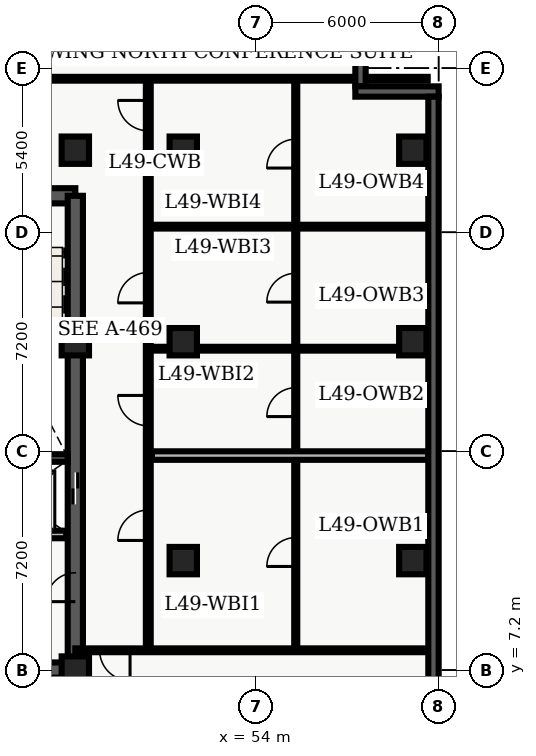
"""IFC4 building model, lengths in metres.
Left out: names, types, materials, properties, quantities, classifications, styles, units other than length and angle.
Written with IfcOpenShell. Run it as: python <this file> out.ifc"""

import sys

from ifc_helpers import new_model, entity, si_unit, converted_unit, direction, frame, origin_with_axes, origin_2d_with_axis, place, context, subcontext, project, spatial, polyline, rectangle, outline, extrude, element, fill, save


model = new_model("IFC4")
c1 = context("Model", 3, precision=1e-05, world=origin_with_axes(), true_north=direction((0.0, 1.0)))
c2 = subcontext(c1, "Body", "Model", "MODEL_VIEW")
j1 = project(units=[si_unit("LENGTHUNIT", "METRE"), converted_unit("PLANEANGLEUNIT", "DEGREE", entity("IfcPlaneAngleMeasure", 0.017), si_unit("PLANEANGLEUNIT", "RADIAN"), dimensions=[0, 0, 0, 0, 0, 0, 0])], contexts=[c1])
p1 = place(None, origin_with_axes())
s1 = spatial("IfcSite", under=j1, at=p1, CompositionType="ELEMENT")
p2 = place(p1, origin_with_axes())
s2 = spatial("IfcBuilding", under=s1, at=p2, CompositionType="ELEMENT")
p3 = place(p2, frame((0.0, 0.0, 200.4), z_axis=(0.0, 0.0, 1.0), x_axis=(1.0, 0.0, 0.0)))
s3 = spatial("IfcBuildingStorey", under=s2, at=p3, CompositionType="ELEMENT", Elevation=200.4)
p4 = place(p3, frame((40.2, 7.2, 0.0), z_axis=(0.0, 0.0, 1.0), x_axis=(1.0, 0.0, 0.0)))
e1 = element("IfcWall", 1, at=p4, inside=s3, PredefinedType="SHEAR", context=c2, shape_type="SweptSolid", body=[
    extrude(outline(polyline([(0.0, -0.25), (7.85, -0.25), (7.85, 0.25), (0.0, 0.25), (0.0, -0.25)])), origin_with_axes(), (0.0, 0.0, 1.0), 3.66),
])
p5 = place(p4, frame((2.175, 0.0, 0.0), z_axis=(0.0, 0.0, 1.0), x_axis=(1.0, 0.0, 0.0)))
e2 = element("IfcOpeningElement", 2, at=p5, cuts=e1, PredefinedType="OPENING", context=c2, shape_type="SweptSolid", body=[
    extrude(rectangle(XDim=1.05, YDim=0.52, at=origin_2d_with_axis()), origin_with_axes(), (0.0, 0.0, 1.0), 2.15),
])
p6 = place(p3, frame((40.2, 22.8, 0.0), z_axis=(0.0, 0.0, 1.0), x_axis=(1.0, 0.0, 0.0)))
e3 = element("IfcWall", 3, at=p6, inside=s3, PredefinedType="SHEAR", context=c2, shape_type="SweptSolid", body=[
    extrude(outline(polyline([(0.0, -0.25), (7.85, -0.25), (7.85, 0.25), (0.0, 0.25), (0.0, -0.25)])), origin_with_axes(), (0.0, 0.0, 1.0), 3.66),
])
p7 = place(p6, frame((5.775, 0.0, 0.0), z_axis=(0.0, 0.0, 1.0), x_axis=(1.0, 0.0, 0.0)))
e4 = element("IfcOpeningElement", 4, at=p7, cuts=e3, PredefinedType="OPENING", context=c2, shape_type="SweptSolid", body=[
    extrude(rectangle(XDim=1.05, YDim=0.52, at=origin_2d_with_axis()), origin_with_axes(), (0.0, 0.0, 1.0), 2.15),
])
p8 = place(p3, frame((48.05, 7.2, 0.0), z_axis=(0.0, 0.0, 1.0), x_axis=(0.0, 1.0, 0.0)))
e5 = element("IfcWall", 5, at=p8, inside=s3, PredefinedType="SHEAR", context=c2, shape_type="SweptSolid", body=[
    extrude(outline(polyline([(0.0, -0.25), (15.6, -0.25), (15.6, 0.25), (0.0, 0.25), (0.0, -0.25)])), origin_with_axes(), (0.0, 0.0, 1.0), 3.66),
])
p9 = place(p8, frame((5.975, 0.0, 0.0), z_axis=(0.0, 0.0, 1.0), x_axis=(1.0, 0.0, 0.0)))
e6 = element("IfcOpeningElement", 6, at=p9, cuts=e5, PredefinedType="OPENING", context=c2, shape_type="SweptSolid", body=[
    extrude(rectangle(XDim=1.05, YDim=0.52, at=origin_2d_with_axis()), origin_with_axes(), (0.0, 0.0, 1.0), 2.15),
])
p10 = place(p8, frame((2.725, 0.0, 0.0), z_axis=(0.0, 0.0, 1.0), x_axis=(1.0, 0.0, 0.0)))
e7 = element("IfcOpeningElement", 7, at=p10, cuts=e5, PredefinedType="OPENING", context=c2, shape_type="SweptSolid", body=[
    extrude(rectangle(XDim=0.95, YDim=0.52, at=origin_2d_with_axis()), origin_with_axes(), (0.0, 0.0, 1.0), 2.15),
])
p11 = place(p3, frame((44.25, 14.175, 0.0), z_axis=(0.0, 0.0, 1.0), x_axis=(1.0, 0.0, 0.0)))
e8 = element("IfcWall", 8, at=p11, inside=s3, PredefinedType="SHEAR", context=c2, shape_type="SweptSolid", body=[
    extrude(outline(polyline([(0.0, -0.125), (3.55, -0.125), (3.55, 0.125), (0.0, 0.125), (0.0, -0.125)])), origin_with_axes(), (0.0, 0.0, 1.0), 3.66),
])
for number, where, z_axis, x_axis in (
    (9, (48.05, 7.2, 0.0), (0.0, 0.0, 1.0), (1.0, 0.0, 0.0)),
    (10, (48.05, 18.0, 0.0), (0.0, 0.0, 1.0), (1.0, 0.0, 0.0)),
    (11, (48.05, 24.3, 0.0), (0.0, 0.0, 1.0), (1.0, 0.0, 0.0)),
    (12, (51.6, 10.8, 0.0), (0.0, 0.0, 1.0), (1.0, 0.0, 0.0)),
    (13, (51.6, 18.0, 0.0), (0.0, 0.0, 1.0), (1.0, 0.0, 0.0)),
    (14, (51.6, 24.3, 0.0), (0.0, 0.0, 1.0), (1.0, 0.0, 0.0)),
    (15, (59.15, 10.8, 0.0), (0.0, 0.0, 1.0), (1.0, 0.0, 0.0)),
    (16, (59.15, 18.0, 0.0), (0.0, 0.0, 1.0), (1.0, 0.0, 0.0)),
    (17, (59.15, 24.3, 0.0), (0.0, 0.0, 1.0), (1.0, 0.0, 0.0)),
):
    element("IfcColumn", number, at=place(p3, frame(where, z_axis=z_axis, x_axis=x_axis)), inside=s3, PredefinedType="COLUMN", context=c2, shape_type="SweptSolid", body=[
        extrude(rectangle(XDim=0.9, YDim=0.9, at=origin_2d_with_axis()), origin_with_axes(), (0.0, 0.0, 1.0), 3.9),
    ])
p12 = place(p3, frame((44.25, 11.66, 0.0), z_axis=(0.0, 0.0, 1.0), x_axis=(1.0, 0.0, 0.0)))
e18 = element("IfcWall", 18, at=p12, inside=s3, PredefinedType="SOLIDWALL", context=c2, shape_type="SweptSolid", body=[
    extrude(outline(polyline([(0.0, -0.125), (3.5, -0.125), (3.5, 0.125), (0.0, 0.125), (0.0, -0.125)])), origin_with_axes(), (0.0, 0.0, 1.0), 2.7),
])
p13 = place(p3, frame((50.45, 7.85, 0.0), z_axis=(0.0, 0.0, 1.0), x_axis=(0.0, 1.0, 0.0)))
e19 = element("IfcWall", 19, at=p13, inside=s3, PredefinedType="PARTITIONING", context=c2, shape_type="SweptSolid", body=[
    extrude(outline(polyline([(0.0, -0.08), (18.8, -0.08), (18.8, 0.08), (0.0, 0.08), (0.0, -0.08)])), origin_with_axes(), (0.0, 0.0, 1.0), 2.7),
])
p14 = place(p13, frame((4.113, 0.0, 0.0), z_axis=(0.0, 0.0, 1.0), x_axis=(1.0, 0.0, 0.0)))
e20 = element("IfcOpeningElement", 20, at=p14, cuts=e19, PredefinedType="OPENING", context=c2, shape_type="SweptSolid", body=[
    extrude(rectangle(XDim=1.0, YDim=0.18, at=origin_2d_with_axis()), origin_with_axes(), (0.0, 0.0, 1.0), 2.15),
])
p15 = place(p13, frame((7.883, 0.0, 0.0), z_axis=(0.0, 0.0, 1.0), x_axis=(1.0, 0.0, 0.0)))
e21 = element("IfcOpeningElement", 21, at=p15, cuts=e19, PredefinedType="OPENING", context=c2, shape_type="SweptSolid", body=[
    extrude(rectangle(XDim=1.0, YDim=0.18, at=origin_2d_with_axis()), origin_with_axes(), (0.0, 0.0, 1.0), 2.15),
])
p16 = place(p13, frame((11.928, 0.0, 0.0), z_axis=(0.0, 0.0, 1.0), x_axis=(1.0, 0.0, 0.0)))
e22 = element("IfcOpeningElement", 22, at=p16, cuts=e19, PredefinedType="OPENING", context=c2, shape_type="SweptSolid", body=[
    extrude(rectangle(XDim=1.0, YDim=0.18, at=origin_2d_with_axis()), origin_with_axes(), (0.0, 0.0, 1.0), 2.15),
])
p17 = place(p13, frame((17.587, 0.0, 0.0), z_axis=(0.0, 0.0, 1.0), x_axis=(1.0, 0.0, 0.0)))
e23 = element("IfcOpeningElement", 23, at=p17, cuts=e19, PredefinedType="OPENING", context=c2, shape_type="SweptSolid", body=[
    extrude(rectangle(XDim=1.0, YDim=0.18, at=origin_2d_with_axis()), origin_with_axes(), (0.0, 0.0, 1.0), 2.15),
])
p18 = place(p3, frame((59.665, 7.85, 0.0), z_axis=(0.0, 0.0, 1.0), x_axis=(-1.0, 0.0, 0.0)))
e24 = element("IfcWall", 24, at=p18, inside=s3, PredefinedType="PARTITIONING", context=c2, shape_type="SweptSolid", body=[
    extrude(outline(polyline([(0.0, -0.062), (11.615, -0.062), (11.615, 0.062), (0.0, 0.062), (0.0, -0.062)])), origin_with_axes(), (0.0, 0.0, 1.0), 2.7),
])
p19 = place(p18, frame((10.315, 0.0, 0.0), z_axis=(0.0, 0.0, 1.0), x_axis=(1.0, 0.0, 0.0)))
e25 = element("IfcOpeningElement", 25, at=p19, cuts=e24, PredefinedType="OPENING", context=c2, shape_type="SweptSolid", body=[
    extrude(rectangle(XDim=1.0, YDim=0.145, at=origin_2d_with_axis()), origin_with_axes(), (0.0, 0.0, 1.0), 2.15),
])
p20 = place(p3, frame((38.735, 26.65, 0.0), z_axis=(0.0, 0.0, 1.0), x_axis=(1.0, 0.0, 0.0)))
e26 = element("IfcWall", 26, at=p20, inside=s3, PredefinedType="PARTITIONING", context=c2, shape_type="SweptSolid", body=[
    extrude(outline(polyline([(0.0, -0.062), (20.905, -0.062), (20.905, 0.062), (0.0, 0.062), (0.0, -0.062)])), origin_with_axes(), (0.0, 0.0, 1.0), 2.7),
])
p21 = place(p20, frame((4.265, 0.0, 0.0), z_axis=(0.0, 0.0, 1.0), x_axis=(1.0, 0.0, 0.0)))
e27 = element("IfcOpeningElement", 27, at=p21, cuts=e26, PredefinedType="OPENING", context=c2, shape_type="SweptSolid", body=[
    extrude(rectangle(XDim=1.0, YDim=0.145, at=origin_2d_with_axis()), origin_with_axes(), (0.0, 0.0, 1.0), 2.15),
])
p22 = place(p3, frame((55.3, 7.98, 0.0), z_axis=(0.0, 0.0, 1.0), x_axis=(0.0, 1.0, 0.0)))
e28 = element("IfcWall", 28, at=p22, inside=s3, PredefinedType="PARTITIONING", context=c2, shape_type="SweptSolid", body=[
    extrude(outline(polyline([(0.0, -0.05), (18.54, -0.05), (18.54, 0.05), (0.0, 0.05), (0.0, -0.05)])), origin_with_axes(), (0.0, 0.0, 1.0), 2.7),
])
p23 = place(p22, frame((3.103, 0.0, 0.0), z_axis=(0.0, 0.0, 1.0), x_axis=(1.0, 0.0, 0.0)))
e29 = element("IfcOpeningElement", 29, at=p23, cuts=e28, PredefinedType="OPENING", context=c2, shape_type="SweptSolid", body=[
    extrude(rectangle(XDim=0.95, YDim=0.12, at=origin_2d_with_axis()), origin_with_axes(), (0.0, 0.0, 1.0), 2.15),
])
p24 = place(p22, frame((8.033, 0.0, 0.0), z_axis=(0.0, 0.0, 1.0), x_axis=(1.0, 0.0, 0.0)))
e30 = element("IfcOpeningElement", 30, at=p24, cuts=e28, PredefinedType="OPENING", context=c2, shape_type="SweptSolid", body=[
    extrude(rectangle(XDim=0.95, YDim=0.12, at=origin_2d_with_axis()), origin_with_axes(), (0.0, 0.0, 1.0), 2.15),
])
p25 = place(p22, frame((11.797, 0.0, 0.0), z_axis=(0.0, 0.0, 1.0), x_axis=(1.0, 0.0, 0.0)))
e31 = element("IfcOpeningElement", 31, at=p25, cuts=e28, PredefinedType="OPENING", context=c2, shape_type="SweptSolid", body=[
    extrude(rectangle(XDim=0.95, YDim=0.12, at=origin_2d_with_axis()), origin_with_axes(), (0.0, 0.0, 1.0), 2.15),
])
p26 = place(p22, frame((16.207, 0.0, 0.0), z_axis=(0.0, 0.0, 1.0), x_axis=(1.0, 0.0, 0.0)))
e32 = element("IfcOpeningElement", 32, at=p26, cuts=e28, PredefinedType="OPENING", context=c2, shape_type="SweptSolid", body=[
    extrude(rectangle(XDim=0.95, YDim=0.12, at=origin_2d_with_axis()), origin_with_axes(), (0.0, 0.0, 1.0), 2.15),
])
p27 = place(p3, frame((50.57, 14.255, 0.0), z_axis=(0.0, 0.0, 1.0), x_axis=(1.0, 0.0, 0.0)))
e33 = element("IfcWall", 33, at=p27, inside=s3, PredefinedType="PARTITIONING", context=c2, shape_type="SweptSolid", body=[
    extrude(outline(polyline([(0.0, -0.14), (9.095, -0.14), (9.095, 0.14), (0.0, 0.14), (0.0, -0.14)])), origin_with_axes(), (0.0, 0.0, 1.0), 2.7),
])
for number, where, z_axis, x_axis in (
    (34, (50.57, 17.77, 0.0), (0.0, 0.0, 1.0), (1.0, 0.0, 0.0)),
    (35, (50.57, 21.785, 0.0), (0.0, 0.0, 1.0), (1.0, 0.0, 0.0)),
):
    element("IfcWall", number, at=place(p3, frame(where, z_axis=z_axis, x_axis=x_axis)), inside=s3, PredefinedType="PARTITIONING", context=c2, shape_type="SweptSolid", body=[
        extrude(outline(polyline([(0.0, -0.062), (9.095, -0.062), (9.095, 0.062), (0.0, 0.062), (0.0, -0.062)])), origin_with_axes(), (0.0, 0.0, 1.0), 2.7),
    ])
p28 = place(p3, frame((57.43, 28.46, 0.0), z_axis=(0.0, 0.0, 1.0), x_axis=(0.0, -1.0, 0.0)))
e36 = element("IfcWall", 36, at=p28, inside=s3, PredefinedType="SOLIDWALL", context=c2, shape_type="SweptSolid", body=[
    extrude(outline(polyline([(0.0, -0.17), (2.06, -0.17), (2.06, 0.17), (0.0, 0.17), (0.0, -0.17)])), origin_with_axes(), (0.0, 0.0, 1.0), 3.66),
])
p29 = place(p3, frame((57.26, 26.23, 0.0), z_axis=(0.0, 0.0, 1.0), x_axis=(1.0, 0.0, 0.0)))
e37 = element("IfcWall", 37, at=p29, inside=s3, PredefinedType="SOLIDWALL", context=c2, shape_type="SweptSolid", body=[
    extrude(outline(polyline([(0.0, -0.17), (2.74, -0.17), (2.74, 0.17), (0.0, 0.17), (0.0, -0.17)])), origin_with_axes(), (0.0, 0.0, 1.0), 3.66),
])
p30 = place(p3, frame((59.83, 26.06, 0.0), z_axis=(0.0, 0.0, 1.0), x_axis=(0.0, -1.0, 0.0)))
e38 = element("IfcWall", 38, at=p30, inside=s3, PredefinedType="SOLIDWALL", context=c2, shape_type="SweptSolid", body=[
    extrude(outline(polyline([(0.0, -0.17), (23.66, -0.17), (23.66, 0.17), (0.0, 0.17), (0.0, -0.17)])), origin_with_axes(), (0.0, 0.0, 1.0), 3.66),
])
p31 = place(p30, frame((20.364, 0.0, 0.45), z_axis=(0.0, 0.0, 1.0), x_axis=(1.0, 0.0, 0.0)))
e39 = element("IfcOpeningElement", 39, at=p31, cuts=e38, PredefinedType="OPENING", context=c2, shape_type="SweptSolid", body=[
    extrude(rectangle(XDim=1.8, YDim=0.36, at=origin_2d_with_axis()), origin_with_axes(), (0.0, 0.0, 1.0), 2.1),
])
p32 = place(p8, frame((5.975, 0.0, 0.0), z_axis=(0.0, 0.0, 1.0), x_axis=(1.0, 0.0, 0.0)))
e40 = element("IfcDoor", 40, at=p32, inside=s3, OperationType="SLIDING_TO_LEFT", PredefinedType="DOOR", context=c2, shape_type="SweptSolid", body=[
    extrude(rectangle(XDim=1.05, YDim=0.09, at=origin_2d_with_axis()), origin_with_axes(), (0.0, 0.0, 1.0), 2.15),
])
fill(e6, e40)
p33 = place(p8, frame((2.725, 0.0, 0.0), z_axis=(0.0, 0.0, 1.0), x_axis=(1.0, 0.0, 0.0)))
e41 = element("IfcDoor", 41, at=p33, inside=s3, OperationType="SINGLE_SWING_LEFT", PredefinedType="DOOR", context=c2, shape_type="SweptSolid", body=[
    extrude(rectangle(XDim=0.95, YDim=0.09, at=origin_2d_with_axis()), origin_with_axes(), (0.0, 0.0, 1.0), 2.15),
])
fill(e7, e41)
p34 = place(p18, frame((10.315, 0.0, 0.0), z_axis=(0.0, 0.0, 1.0), x_axis=(1.0, 0.0, 0.0)))
e42 = element("IfcDoor", 42, at=p34, inside=s3, OperationType="SINGLE_SWING_LEFT", PredefinedType="DOOR", context=c2, shape_type="SweptSolid", body=[
    extrude(rectangle(XDim=1.0, YDim=0.075, at=origin_2d_with_axis()), origin_with_axes(), (0.0, 0.0, 1.0), 2.15),
])
fill(e25, e42)
p35 = place(p22, frame((3.103, 0.0, 0.0), z_axis=(0.0, 0.0, 1.0), x_axis=(1.0, 0.0, 0.0)))
e43 = element("IfcDoor", 43, at=p35, inside=s3, OperationType="SINGLE_SWING_LEFT", PredefinedType="DOOR", context=c2, shape_type="SweptSolid", body=[
    extrude(rectangle(XDim=0.95, YDim=0.06, at=origin_2d_with_axis()), origin_with_axes(), (0.0, 0.0, 1.0), 2.15),
])
fill(e29, e43)
p36 = place(p13, frame((4.113, 0.0, 0.0), z_axis=(0.0, 0.0, 1.0), x_axis=(1.0, 0.0, 0.0)))
e44 = element("IfcDoor", 44, at=p36, inside=s3, OperationType="SINGLE_SWING_LEFT", PredefinedType="DOOR", context=c2, shape_type="SweptSolid", body=[
    extrude(rectangle(XDim=1.0, YDim=0.09, at=origin_2d_with_axis()), origin_with_axes(), (0.0, 0.0, 1.0), 2.15),
])
fill(e20, e44)
p37 = place(p22, frame((8.033, 0.0, 0.0), z_axis=(0.0, 0.0, 1.0), x_axis=(1.0, 0.0, 0.0)))
e45 = element("IfcDoor", 45, at=p37, inside=s3, OperationType="SINGLE_SWING_LEFT", PredefinedType="DOOR", context=c2, shape_type="SweptSolid", body=[
    extrude(rectangle(XDim=0.95, YDim=0.06, at=origin_2d_with_axis()), origin_with_axes(), (0.0, 0.0, 1.0), 2.15),
])
fill(e30, e45)
p38 = place(p13, frame((7.883, 0.0, 0.0), z_axis=(0.0, 0.0, 1.0), x_axis=(1.0, 0.0, 0.0)))
e46 = element("IfcDoor", 46, at=p38, inside=s3, OperationType="SINGLE_SWING_RIGHT", PredefinedType="DOOR", context=c2, shape_type="SweptSolid", body=[
    extrude(rectangle(XDim=1.0, YDim=0.09, at=origin_2d_with_axis()), origin_with_axes(), (0.0, 0.0, 1.0), 2.15),
])
fill(e21, e46)
p39 = place(p22, frame((11.797, 0.0, 0.0), z_axis=(0.0, 0.0, 1.0), x_axis=(1.0, 0.0, 0.0)))
e47 = element("IfcDoor", 47, at=p39, inside=s3, OperationType="SINGLE_SWING_LEFT", PredefinedType="DOOR", context=c2, shape_type="SweptSolid", body=[
    extrude(rectangle(XDim=0.95, YDim=0.06, at=origin_2d_with_axis()), origin_with_axes(), (0.0, 0.0, 1.0), 2.15),
])
fill(e31, e47)
p40 = place(p13, frame((11.928, 0.0, 0.0), z_axis=(0.0, 0.0, 1.0), x_axis=(1.0, 0.0, 0.0)))
e48 = element("IfcDoor", 48, at=p40, inside=s3, OperationType="SINGLE_SWING_LEFT", PredefinedType="DOOR", context=c2, shape_type="SweptSolid", body=[
    extrude(rectangle(XDim=1.0, YDim=0.09, at=origin_2d_with_axis()), origin_with_axes(), (0.0, 0.0, 1.0), 2.15),
])
fill(e22, e48)
p41 = place(p22, frame((16.207, 0.0, 0.0), z_axis=(0.0, 0.0, 1.0), x_axis=(1.0, 0.0, 0.0)))
e49 = element("IfcDoor", 49, at=p41, inside=s3, OperationType="SINGLE_SWING_LEFT", PredefinedType="DOOR", context=c2, shape_type="SweptSolid", body=[
    extrude(rectangle(XDim=0.95, YDim=0.06, at=origin_2d_with_axis()), origin_with_axes(), (0.0, 0.0, 1.0), 2.15),
])
fill(e32, e49)
p42 = place(p13, frame((17.587, 0.0, 0.0), z_axis=(0.0, 0.0, 1.0), x_axis=(1.0, 0.0, 0.0)))
e50 = element("IfcDoor", 50, at=p42, inside=s3, OperationType="SINGLE_SWING_RIGHT", PredefinedType="DOOR", context=c2, shape_type="SweptSolid", body=[
    extrude(rectangle(XDim=1.0, YDim=0.09, at=origin_2d_with_axis()), origin_with_axes(), (0.0, 0.0, 1.0), 2.15),
])
fill(e23, e50)
save(model, sys.argv[1])
